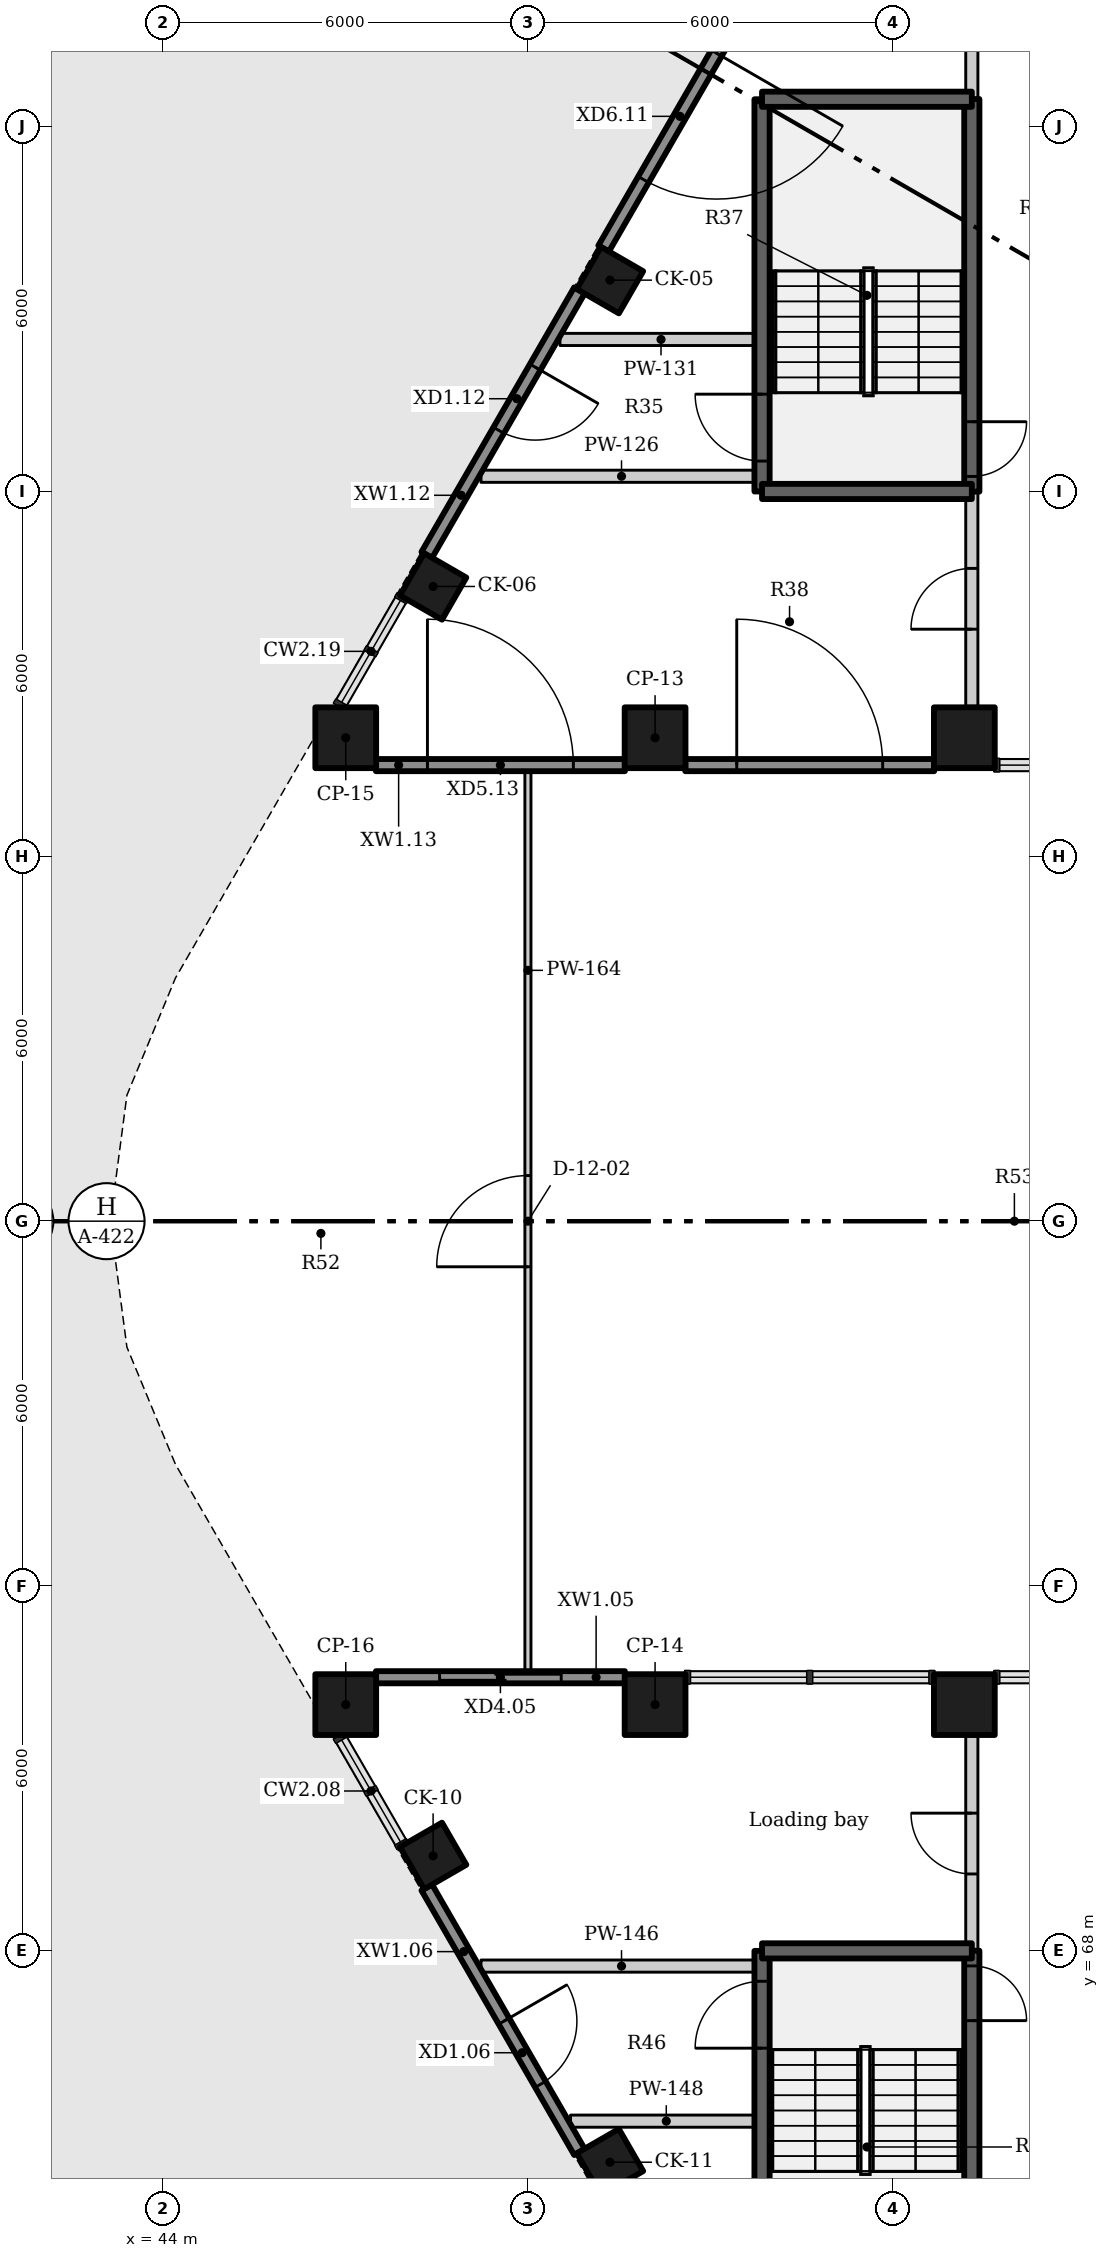
"""IFC4 building model, lengths in metres.
Left out: names, types, materials, properties, quantities, classifications, styles, units other than length and angle.
Written with IfcOpenShell. Run it as: python <this file> out.ifc"""

import sys

from ifc_helpers import new_model, si_unit, direction, frame, frame_2d, origin, origin_2d, place, context, subcontext, project, spatial, rectangle, extrude, element, fill, save


model = new_model("IFC4")
c1 = context("Model", 3, precision=1e-05, world=origin(), true_north=direction((0.0, 1.0)))
c2 = subcontext(c1, "Body", "Model", "MODEL_VIEW")
j1 = project(units=[si_unit("LENGTHUNIT", "METRE"), si_unit("PLANEANGLEUNIT", "RADIAN")], contexts=[c1])
p1 = place(None, origin())
s1 = spatial("IfcSite", under=j1, at=p1, CompositionType="ELEMENT")
p2 = place(p1, origin())
s2 = spatial("IfcBuilding", under=s1, at=p2, CompositionType="ELEMENT")
p3 = place(p2, origin())
s3 = spatial("IfcBuildingStorey", under=s2, at=p3, CompositionType="ELEMENT", Elevation=0.0)
for number, where, z_axis, x_axis in (
    (1, (51.349, 95.475, -1.8), (0.0, 0.0, 1.0), (-0.5, -0.866, 0.0)),
    (2, (48.441, 90.438, -1.8), (0.0, 0.0, 1.0), (-0.5, -0.866, 0.0)),
    (3, (48.441, 69.562, -1.8), (0.0, 0.0, 1.0), (0.5, -0.866, 0.0)),
    (4, (51.349, 64.525, -1.8), (0.0, 0.0, 1.0), (0.5, -0.866, 0.0)),
):
    element("IfcColumn", number, at=place(p3, frame(where, z_axis=z_axis, x_axis=x_axis)), inside=s3, PredefinedType="COLUMN", context=c2, shape_type="SweptSolid", body=[
        extrude(rectangle(XDim=0.8, YDim=0.8, at=origin_2d()), origin(), (0.0, 0.0, 1.0), 8.4),
    ])
for number, where, z_axis, x_axis in (
    (5, (57.177, 87.95, -1.8), (0.0, 0.0, 1.0), (1.0, 0.0, 0.0)),
    (6, (57.177, 72.05, -1.8), (0.0, 0.0, 1.0), (1.0, 0.0, 0.0)),
    (7, (52.091, 87.95, -1.8), (0.0, 0.0, 1.0), (1.0, 0.0, 0.0)),
    (8, (52.091, 72.05, -1.8), (0.0, 0.0, 1.0), (1.0, 0.0, 0.0)),
    (9, (47.004, 87.95, -1.8), (0.0, 0.0, 1.0), (1.0, 0.0, 0.0)),
    (10, (47.004, 72.05, -1.8), (0.0, 0.0, 1.0), (1.0, 0.0, 0.0)),
):
    element("IfcColumn", number, at=place(p3, frame(where, z_axis=z_axis, x_axis=x_axis)), inside=s3, PredefinedType="COLUMN", context=c2, shape_type="SweptSolid", body=[
        extrude(rectangle(XDim=1.0, YDim=1.0, at=origin_2d()), origin(), (0.0, 0.0, 1.0), 8.4),
    ])
p4 = place(p3, frame((51.595, 72.5, 0.0), z_axis=(0.0, 0.0, 1.0), x_axis=(-1.0, 0.0, 0.0)))
e11 = element("IfcWall", 11, at=p4, inside=s3, PredefinedType="SOLIDWALL", context=c2, shape_type="SweptSolid", body=[
    extrude(rectangle(XDim=4.095, YDim=0.2, at=frame_2d((2.047, 0.0))), origin(), (0.0, 0.0, 1.0), 5.4),
])
p5 = place(p4, frame((1.048, 0.0, 0.0)))
e12 = element("IfcOpeningElement", 12, at=p5, cuts=e11, PredefinedType="OPENING", context=c2, shape_type="SweptSolid", body=[
    extrude(rectangle(XDim=2.0, YDim=3.0, at=frame_2d((1.0, 1.5))), frame((0.0, 0.11, 0.0), z_axis=(0.0, -1.0, 0.0), x_axis=(1.0, 0.0, 0.0)), (0.0, 0.0, 1.0), 0.22),
])
p6 = place(p3, frame((48.336, 69.044, 0.0), z_axis=(0.0, 0.0, 1.0), x_axis=(0.499953773667, -0.866052090925, 0.0)))
e13 = element("IfcWall", 13, at=p6, inside=s3, PredefinedType="SOLIDWALL", context=c2, shape_type="SweptSolid", body=[
    extrude(rectangle(XDim=5.025, YDim=0.2, at=frame_2d((2.512, 0.0))), origin(), (0.0, 0.0, 1.0), 5.4),
])
p7 = place(p6, frame((2.54, 0.0, 0.0)))
e14 = element("IfcOpeningElement", 14, at=p7, cuts=e13, PredefinedType="OPENING", context=c2, shape_type="SweptSolid", body=[
    extrude(rectangle(XDim=1.2, YDim=2.4, at=frame_2d((0.6, 1.2))), frame((0.0, 0.11, 0.0), z_axis=(0.0, -1.0, 0.0), x_axis=(1.0, 0.0, 0.0)), (0.0, 0.0, 1.0), 0.22),
])
p8 = place(p3, frame((53.756, 100.345, 0.0), z_axis=(0.0, 0.0, 1.0), x_axis=(-0.500011252833, -0.866018906861, 0.0)))
e15 = element("IfcWall", 15, at=p8, inside=s3, PredefinedType="SOLIDWALL", context=c2, shape_type="SweptSolid", body=[
    extrude(rectangle(XDim=5.025, YDim=0.2, at=frame_2d((2.512, 0.0))), origin(), (0.0, 0.0, 1.0), 5.4),
])
p9 = place(p8, frame((1.312, 0.0, 0.0)))
e16 = element("IfcOpeningElement", 16, at=p9, cuts=e15, PredefinedType="OPENING", context=c2, shape_type="SweptSolid", body=[
    extrude(rectangle(XDim=2.4, YDim=2.7, at=frame_2d((1.2, 1.35))), frame((0.0, 0.11, 0.0), z_axis=(0.0, -1.0, 0.0), x_axis=(1.0, 0.0, 0.0)), (0.0, 0.0, 1.0), 0.22),
])
p10 = place(p3, frame((50.848, 95.307, 0.0), z_axis=(0.0, 0.0, 1.0), x_axis=(-0.499953773667, -0.866052090925, 0.0)))
e17 = element("IfcWall", 17, at=p10, inside=s3, PredefinedType="SOLIDWALL", context=c2, shape_type="SweptSolid", body=[
    extrude(rectangle(XDim=5.025, YDim=0.2, at=frame_2d((2.512, 0.0))), origin(), (0.0, 0.0, 1.0), 5.4),
])
p11 = place(p10, frame((1.458, 0.0, 0.0)))
e18 = element("IfcOpeningElement", 18, at=p11, cuts=e17, PredefinedType="OPENING", context=c2, shape_type="SweptSolid", body=[
    extrude(rectangle(XDim=1.2, YDim=2.4, at=frame_2d((0.6, 1.2))), frame((0.0, 0.11, 0.0), z_axis=(0.0, -1.0, 0.0), x_axis=(1.0, 0.0, 0.0)), (0.0, 0.0, 1.0), 0.22),
])
p12 = place(p3, frame((47.5, 87.5, 0.0), z_axis=(0.0, 0.0, 1.0), x_axis=(1.0, 0.0, 0.0)))
e19 = element("IfcWall", 19, at=p12, inside=s3, PredefinedType="SOLIDWALL", context=c2, shape_type="SweptSolid", body=[
    extrude(rectangle(XDim=4.095, YDim=0.2, at=frame_2d((2.047, 0.0))), origin(), (0.0, 0.0, 1.0), 5.4),
])
p13 = place(p12, frame((0.847, 0.0, 0.0)))
e20 = element("IfcOpeningElement", 20, at=p13, cuts=e19, PredefinedType="OPENING", context=c2, shape_type="SweptSolid", body=[
    extrude(rectangle(XDim=2.4, YDim=2.7, at=frame_2d((1.2, 1.35))), frame((0.0, 0.11, 0.0), z_axis=(0.0, -1.0, 0.0), x_axis=(1.0, 0.0, 0.0)), (0.0, 0.0, 1.0), 0.22),
])
p14 = place(p3, frame((52.587, 87.5, 0.0), z_axis=(0.0, 0.0, 1.0), x_axis=(1.0, 0.0, 0.0)))
e21 = element("IfcWall", 21, at=p14, inside=s3, PredefinedType="SOLIDWALL", context=c2, shape_type="SweptSolid", body=[
    extrude(rectangle(XDim=4.094, YDim=0.2, at=frame_2d((2.047, 0.0))), origin(), (0.0, 0.0, 1.0), 5.4),
])
p15 = place(p14, frame((0.847, 0.0, 0.0)))
e22 = element("IfcOpeningElement", 22, at=p15, cuts=e21, PredefinedType="OPENING", context=c2, shape_type="SweptSolid", body=[
    extrude(rectangle(XDim=2.4, YDim=2.7, at=frame_2d((1.2, 1.35))), frame((0.0, 0.11, 0.0), z_axis=(0.0, -1.0, 0.0), x_axis=(1.0, 0.0, 0.0)), (0.0, 0.0, 1.0), 0.22),
])
p16 = place(p3, frame((57.3, 68.003, -1.8), z_axis=(0.0, 0.0, 1.0), x_axis=(0.0, -1.0, 0.0)))
e23 = element("IfcWall", 23, at=p16, inside=s3, PredefinedType="SHEAR", context=c2, shape_type="SweptSolid", body=[
    extrude(rectangle(XDim=6.456, YDim=0.25, at=frame_2d((3.228, 0.0))), origin(), (0.0, 0.0, 1.0), 8.1),
])
p17 = place(p16, frame((0.25, 0.0, 1.8)))
e24 = element("IfcOpeningElement", 24, at=p17, cuts=e23, PredefinedType="OPENING", context=c2, shape_type="SweptSolid", body=[
    extrude(rectangle(XDim=0.9, YDim=2.1, at=frame_2d((0.45, 1.05))), frame((0.0, 0.135, 0.0), z_axis=(0.0, -1.0, 0.0), x_axis=(1.0, 0.0, 0.0)), (0.0, 0.0, 1.0), 0.27),
])
p18 = place(p3, frame((57.3, 98.453, -1.8), z_axis=(0.0, 0.0, 1.0), x_axis=(0.0, -1.0, 0.0)))
e25 = element("IfcWall", 25, at=p18, inside=s3, PredefinedType="SHEAR", context=c2, shape_type="SweptSolid", body=[
    extrude(rectangle(XDim=6.456, YDim=0.25, at=frame_2d((3.228, 0.0))), origin(), (0.0, 0.0, 1.0), 8.1),
])
p19 = place(p18, frame((5.306, 0.0, 1.8)))
e26 = element("IfcOpeningElement", 26, at=p19, cuts=e25, PredefinedType="OPENING", context=c2, shape_type="SweptSolid", body=[
    extrude(rectangle(XDim=0.9, YDim=2.1, at=frame_2d((0.45, 1.05))), frame((0.0, 0.135, 0.0), z_axis=(0.0, -1.0, 0.0), x_axis=(1.0, 0.0, 0.0)), (0.0, 0.0, 1.0), 0.27),
])
p20 = place(p3, frame((57.3, 67.997, 0.0), z_axis=(0.0, 0.0, 1.0), x_axis=(0.0, 1.0, 0.0)))
e27 = element("IfcWall", 27, at=p20, inside=s3, PredefinedType="PARTITIONING", context=c2, shape_type="SweptSolid", body=[
    extrude(rectangle(XDim=3.536, YDim=0.2, at=frame_2d((1.768, 0.0))), origin(), (0.0, 0.0, 1.0), 6.3),
])
p21 = place(p20, frame((1.268, 0.0, 0.0)))
e28 = element("IfcOpeningElement", 28, at=p21, cuts=e27, PredefinedType="OPENING", context=c2, shape_type="SweptSolid", body=[
    extrude(rectangle(XDim=1.0, YDim=2.1, at=frame_2d((0.5, 1.05))), frame((0.0, 0.11, 0.0), z_axis=(0.0, -1.0, 0.0), x_axis=(1.0, 0.0, 0.0)), (0.0, 0.0, 1.0), 0.22),
])
p22 = place(p3, frame((57.3, 88.467, 0.0), z_axis=(0.0, 0.0, 1.0), x_axis=(0.0, 1.0, 0.0)))
e29 = element("IfcWall", 29, at=p22, inside=s3, PredefinedType="PARTITIONING", context=c2, shape_type="SweptSolid", body=[
    extrude(rectangle(XDim=3.536, YDim=0.2, at=frame_2d((1.768, 0.0))), origin(), (0.0, 0.0, 1.0), 6.3),
])
p23 = place(p22, frame((1.268, 0.0, 0.0)))
e30 = element("IfcOpeningElement", 30, at=p23, cuts=e29, PredefinedType="OPENING", context=c2, shape_type="SweptSolid", body=[
    extrude(rectangle(XDim=1.0, YDim=2.1, at=frame_2d((0.5, 1.05))), frame((0.0, 0.11, 0.0), z_axis=(0.0, -1.0, 0.0), x_axis=(1.0, 0.0, 0.0)), (0.0, 0.0, 1.0), 0.22),
])
p24 = place(p3, frame((57.3, 98.447, 0.0), z_axis=(0.0, 0.0, 1.0), x_axis=(0.0, 1.0, 0.0)))
e31 = element("IfcWall", 31, at=p24, inside=s3, PredefinedType="PARTITIONING", context=c2, shape_type="SweptSolid", body=[
    extrude(rectangle(XDim=6.544, YDim=0.2, at=frame_2d((3.272, 0.0))), origin(), (0.0, 0.0, 1.0), 6.3),
])
p25 = place(p24, frame((2.772, 0.0, 0.0)))
e32 = element("IfcOpeningElement", 32, at=p25, cuts=e31, PredefinedType="OPENING", context=c2, shape_type="SweptSolid", body=[
    extrude(rectangle(XDim=1.0, YDim=2.1, at=frame_2d((0.5, 1.05))), frame((0.0, 0.11, 0.0), z_axis=(0.0, -1.0, 0.0), x_axis=(1.0, 0.0, 0.0)), (0.0, 0.0, 1.0), 0.22),
])
p26 = place(p3, frame((49.229, 92.25, 0.0), z_axis=(0.0, 0.0, 1.0), x_axis=(1.0, 0.0, 0.0)))
e33 = element("IfcWall", 33, at=p26, inside=s3, PredefinedType="PARTITIONING", context=c2, shape_type="SweptSolid", body=[
    extrude(rectangle(XDim=4.622, YDim=0.2, at=frame_2d((2.311, 0.0))), origin(), (0.0, 0.0, 1.0), 5.53),
])
p27 = place(p3, frame((53.85, 61.55, -1.8), z_axis=(0.0, 0.0, 1.0), x_axis=(0.0, 1.0, 0.0)))
e34 = element("IfcWall", 34, at=p27, inside=s3, PredefinedType="SHEAR", context=c2, shape_type="SweptSolid", body=[
    extrude(rectangle(XDim=6.45, YDim=0.25, at=frame_2d((3.225, 0.0))), origin(), (0.0, 0.0, 1.0), 8.1),
])
p28 = place(p27, frame((4.85, 0.0, 1.8)))
e35 = element("IfcOpeningElement", 35, at=p28, cuts=e34, PredefinedType="OPENING", context=c2, shape_type="SweptSolid", body=[
    extrude(rectangle(XDim=1.1, YDim=2.1, at=frame_2d((0.55, 1.05))), frame((0.0, 0.135, 0.0), z_axis=(0.0, -1.0, 0.0), x_axis=(1.0, 0.0, 0.0)), (0.0, 0.0, 1.0), 0.27),
])
p29 = place(p3, frame((53.85, 92.0, -1.8), z_axis=(0.0, 0.0, 1.0), x_axis=(0.0, 1.0, 0.0)))
e36 = element("IfcWall", 36, at=p29, inside=s3, PredefinedType="SHEAR", context=c2, shape_type="SweptSolid", body=[
    extrude(rectangle(XDim=6.45, YDim=0.25, at=frame_2d((3.225, 0.0))), origin(), (0.0, 0.0, 1.0), 8.1),
])
p30 = place(p29, frame((0.5, 0.0, 1.8)))
e37 = element("IfcOpeningElement", 37, at=p30, cuts=e36, PredefinedType="OPENING", context=c2, shape_type="SweptSolid", body=[
    extrude(rectangle(XDim=1.1, YDim=2.1, at=frame_2d((0.55, 1.05))), frame((0.0, 0.135, 0.0), z_axis=(0.0, -1.0, 0.0), x_axis=(1.0, 0.0, 0.0)), (0.0, 0.0, 1.0), 0.27),
])
p31 = place(p3, frame((50.527, 94.5, 0.0), z_axis=(0.0, 0.0, 1.0), x_axis=(1.0, 0.0, 0.0)))
e38 = element("IfcWall", 38, at=p31, inside=s3, PredefinedType="PARTITIONING", context=c2, shape_type="SweptSolid", body=[
    extrude(rectangle(XDim=3.323, YDim=0.2, at=frame_2d((1.661, 0.0))), origin(), (0.0, 0.0, 1.0), 5.53),
])
for number, where, z_axis, x_axis in (
    (39, (53.85, 92.0, -1.8), (0.0, 0.0, 1.0), (1.0, 0.0, 0.0)),
    (40, (53.85, 98.45, -1.8), (0.0, 0.0, 1.0), (1.0, 0.0, 0.0)),
):
    element("IfcWall", number, at=place(p3, frame(where, z_axis=z_axis, x_axis=x_axis)), inside=s3, PredefinedType="SHEAR", context=c2, shape_type="SweptSolid", body=[
        extrude(rectangle(XDim=3.45, YDim=0.25, at=frame_2d((1.725, 0.0))), origin(), (0.0, 0.0, 1.0), 8.1),
    ])
p32 = place(p3, frame((49.229, 67.75, 0.0), z_axis=(0.0, 0.0, 1.0), x_axis=(1.0, 0.0, 0.0)))
e41 = element("IfcWall", 41, at=p32, inside=s3, PredefinedType="PARTITIONING", context=c2, shape_type="SweptSolid", body=[
    extrude(rectangle(XDim=4.622, YDim=0.2, at=frame_2d((2.311, 0.0))), origin(), (0.0, 0.0, 1.0), 5.53),
])
p33 = place(p3, frame((50.701, 65.2, 0.0), z_axis=(0.0, 0.0, 1.0), x_axis=(1.0, 0.0, 0.0)))
e42 = element("IfcWall", 42, at=p33, inside=s3, PredefinedType="PARTITIONING", context=c2, shape_type="SweptSolid", body=[
    extrude(rectangle(XDim=3.149, YDim=0.2, at=frame_2d((1.575, 0.0))), origin(), (0.0, 0.0, 1.0), 5.53),
])
p34 = place(p3, frame((53.85, 68.0, -1.8), z_axis=(0.0, 0.0, 1.0), x_axis=(1.0, 0.0, 0.0)))
e43 = element("IfcWall", 43, at=p34, inside=s3, PredefinedType="SHEAR", context=c2, shape_type="SweptSolid", body=[
    extrude(rectangle(XDim=3.45, YDim=0.25, at=frame_2d((1.725, 0.0))), origin(), (0.0, 0.0, 1.0), 8.1),
])
p35 = place(p3, frame((50.0, 72.6, 0.0), z_axis=(0.0, 0.0, 1.0), x_axis=(0.0, 1.0, 0.0)))
e44 = element("IfcWall", 44, at=p35, inside=s3, PredefinedType="PARTITIONING", context=c2, shape_type="SweptSolid", body=[
    extrude(rectangle(XDim=14.8, YDim=0.1, at=frame_2d((7.4, 0.0))), origin(), (0.0, 0.0, 1.0), 6.3),
])
p36 = place(p35, frame((6.65, 0.0, 0.0)))
e45 = element("IfcOpeningElement", 45, at=p36, cuts=e44, PredefinedType="OPENING", context=c2, shape_type="SweptSolid", body=[
    extrude(rectangle(XDim=1.5, YDim=2.1, at=frame_2d((0.75, 1.05))), frame((0.0, 0.06, 0.0), z_axis=(0.0, -1.0, 0.0), x_axis=(1.0, 0.0, 0.0)), (0.0, 0.0, 1.0), 0.12),
])
p37 = place(p5, origin())
e46 = element("IfcDoor", 46, at=p37, inside=s3, OperationType="ROLLINGUP", PredefinedType="GATE", context=c2, shape_type="SweptSolid", body=[
    extrude(rectangle(XDim=2.0, YDim=3.0, at=frame_2d((1.0, 1.5))), frame((0.0, 0.025, 0.0), z_axis=(0.0, -1.0, 0.0), x_axis=(1.0, 0.0, 0.0)), (0.0, 0.0, 1.0), 0.05),
])
fill(e12, e46)
p38 = place(p7, frame((1.2, 0.0, 0.0), z_axis=(0.0, 0.0, 1.0), x_axis=(-1.0, 0.0, 0.0)))
e47 = element("IfcDoor", 47, at=p38, inside=s3, OperationType="SINGLE_SWING_LEFT", PredefinedType="DOOR", context=c2, shape_type="SweptSolid", body=[
    extrude(rectangle(XDim=1.2, YDim=2.4, at=frame_2d((0.6, 1.2))), frame((0.0, 0.025, 0.0), z_axis=(0.0, -1.0, 0.0), x_axis=(1.0, 0.0, 0.0)), (0.0, 0.0, 1.0), 0.05),
])
fill(e14, e47)
p39 = place(p9, frame((2.4, 0.0, 0.0), z_axis=(0.0, 0.0, 1.0), x_axis=(-1.0, 0.0, 0.0)))
e48 = element("IfcDoor", 48, at=p39, inside=s3, OperationType="DOUBLE_DOOR_DOUBLE_SWING", PredefinedType="DOOR", context=c2, shape_type="SweptSolid", body=[
    extrude(rectangle(XDim=2.4, YDim=2.7, at=frame_2d((1.2, 1.35))), frame((0.0, 0.025, 0.0), z_axis=(0.0, -1.0, 0.0), x_axis=(1.0, 0.0, 0.0)), (0.0, 0.0, 1.0), 0.05),
])
fill(e16, e48)
p40 = place(p11, frame((1.2, 0.0, 0.0), z_axis=(0.0, 0.0, 1.0), x_axis=(-1.0, 0.0, 0.0)))
e49 = element("IfcDoor", 49, at=p40, inside=s3, OperationType="SINGLE_SWING_LEFT", PredefinedType="DOOR", context=c2, shape_type="SweptSolid", body=[
    extrude(rectangle(XDim=1.2, YDim=2.4, at=frame_2d((0.6, 1.2))), frame((0.0, 0.025, 0.0), z_axis=(0.0, -1.0, 0.0), x_axis=(1.0, 0.0, 0.0)), (0.0, 0.0, 1.0), 0.05),
])
fill(e18, e49)
p41 = place(p13, origin())
e50 = element("IfcDoor", 50, at=p41, inside=s3, OperationType="DOUBLE_DOOR_DOUBLE_SWING", PredefinedType="DOOR", context=c2, shape_type="SweptSolid", body=[
    extrude(rectangle(XDim=2.4, YDim=2.7, at=frame_2d((1.2, 1.35))), frame((0.0, 0.025, 0.0), z_axis=(0.0, -1.0, 0.0), x_axis=(1.0, 0.0, 0.0)), (0.0, 0.0, 1.0), 0.05),
])
fill(e20, e50)
p42 = place(p15, origin())
e51 = element("IfcDoor", 51, at=p42, inside=s3, OperationType="DOUBLE_DOOR_DOUBLE_SWING", PredefinedType="DOOR", context=c2, shape_type="SweptSolid", body=[
    extrude(rectangle(XDim=2.4, YDim=2.7, at=frame_2d((1.2, 1.35))), frame((0.0, 0.025, 0.0), z_axis=(0.0, -1.0, 0.0), x_axis=(1.0, 0.0, 0.0)), (0.0, 0.0, 1.0), 0.05),
])
fill(e22, e51)
p43 = place(p30, origin())
e52 = element("IfcDoor", 52, at=p43, inside=s3, OperationType="SINGLE_SWING_RIGHT", PredefinedType="DOOR", context=c2, shape_type="SweptSolid", body=[
    extrude(rectangle(XDim=1.1, YDim=2.1, at=frame_2d((0.55, 1.05))), frame((0.0, 0.025, 0.0), z_axis=(0.0, -1.0, 0.0), x_axis=(1.0, 0.0, 0.0)), (0.0, 0.0, 1.0), 0.05),
])
fill(e37, e52)
p44 = place(p19, origin())
e53 = element("IfcDoor", 53, at=p44, inside=s3, OperationType="SINGLE_SWING_LEFT", PredefinedType="DOOR", context=c2, shape_type="SweptSolid", body=[
    extrude(rectangle(XDim=0.9, YDim=2.1, at=frame_2d((0.45, 1.05))), frame((0.0, 0.025, 0.0), z_axis=(0.0, -1.0, 0.0), x_axis=(1.0, 0.0, 0.0)), (0.0, 0.0, 1.0), 0.05),
])
fill(e26, e53)
p45 = place(p23, origin())
e54 = element("IfcDoor", 54, at=p45, inside=s3, OperationType="SINGLE_SWING_LEFT", PredefinedType="DOOR", context=c2, shape_type="SweptSolid", body=[
    extrude(rectangle(XDim=1.0, YDim=2.1, at=frame_2d((0.5, 1.05))), frame((0.0, 0.025, 0.0), z_axis=(0.0, -1.0, 0.0), x_axis=(1.0, 0.0, 0.0)), (0.0, 0.0, 1.0), 0.05),
])
fill(e30, e54)
p46 = place(p28, origin())
e55 = element("IfcDoor", 55, at=p46, inside=s3, OperationType="SINGLE_SWING_LEFT", PredefinedType="DOOR", context=c2, shape_type="SweptSolid", body=[
    extrude(rectangle(XDim=1.1, YDim=2.1, at=frame_2d((0.55, 1.05))), frame((0.0, 0.025, 0.0), z_axis=(0.0, -1.0, 0.0), x_axis=(1.0, 0.0, 0.0)), (0.0, 0.0, 1.0), 0.05),
])
fill(e35, e55)
p47 = place(p17, origin())
e56 = element("IfcDoor", 56, at=p47, inside=s3, OperationType="SINGLE_SWING_RIGHT", PredefinedType="DOOR", context=c2, shape_type="SweptSolid", body=[
    extrude(rectangle(XDim=0.9, YDim=2.1, at=frame_2d((0.45, 1.05))), frame((0.0, 0.025, 0.0), z_axis=(0.0, -1.0, 0.0), x_axis=(1.0, 0.0, 0.0)), (0.0, 0.0, 1.0), 0.05),
])
fill(e24, e56)
p48 = place(p21, origin())
e57 = element("IfcDoor", 57, at=p48, inside=s3, OperationType="SINGLE_SWING_RIGHT", PredefinedType="DOOR", context=c2, shape_type="SweptSolid", body=[
    extrude(rectangle(XDim=1.0, YDim=2.1, at=frame_2d((0.5, 1.05))), frame((0.0, 0.025, 0.0), z_axis=(0.0, -1.0, 0.0), x_axis=(1.0, 0.0, 0.0)), (0.0, 0.0, 1.0), 0.05),
])
fill(e28, e57)
p49 = place(p36, origin())
e58 = element("IfcDoor", 58, at=p49, inside=s3, OperationType="DOUBLE_DOOR_SINGLE_SWING", PredefinedType="DOOR", context=c2, shape_type="SweptSolid", body=[
    extrude(rectangle(XDim=1.5, YDim=2.1, at=frame_2d((0.75, 1.05))), frame((0.0, 0.025, 0.0), z_axis=(0.0, -1.0, 0.0), x_axis=(1.0, 0.0, 0.0)), (0.0, 0.0, 1.0), 0.05),
])
fill(e45, e58)
save(model, sys.argv[1])
